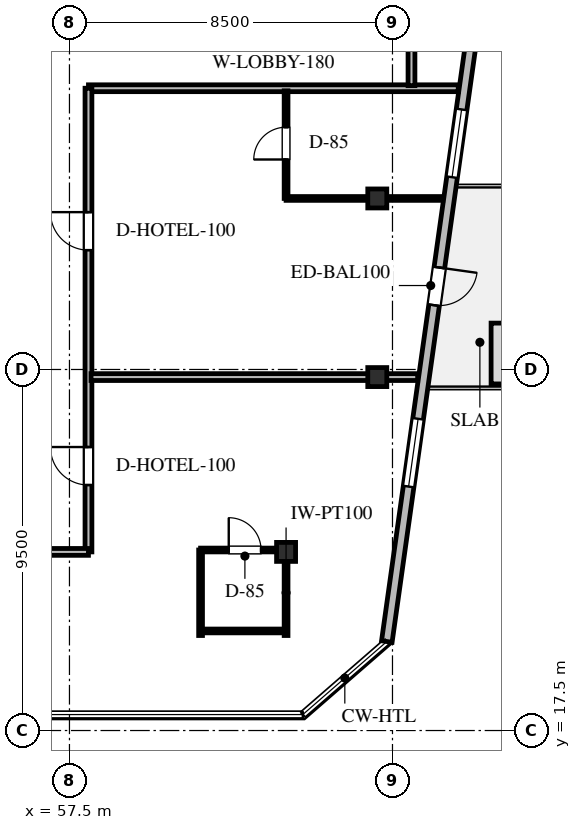
"""IFC4 building model, lengths in metres.
Left out: names, types, materials, properties, quantities, classifications, styles, units other than length and angle.
Written with IfcOpenShell. Run it as: python <this file> out.ifc"""

import sys

from ifc_helpers import new_model, si_unit, direction, frame, frame_2d, origin, origin_2d, place, context, subcontext, project, spatial, rectangle, hollow_rectangle, extrude, element, fill, save


model = new_model("IFC4")
c1 = context("Model", 3, precision=1e-05, world=origin(), true_north=direction((0.0, 1.0)))
c2 = subcontext(c1, "Body", "Model", "MODEL_VIEW")
j1 = project(units=[si_unit("LENGTHUNIT", "METRE"), si_unit("PLANEANGLEUNIT", "RADIAN")], contexts=[c1])
p1 = place(None, origin())
s1 = spatial("IfcSite", under=j1, at=p1, CompositionType="ELEMENT")
p2 = place(p1, origin())
s2 = spatial("IfcBuilding", under=s1, at=p2, CompositionType="ELEMENT")
p3 = place(p2, frame((0.0, 0.0, 256.2)))
s3 = spatial("IfcBuildingStorey", under=s2, at=p3, CompositionType="ELEMENT", Elevation=256.2)
for number, where, z_axis, x_axis in (
    (1, (65.6, 31.5, 0.0), (0.0, 0.0, 1.0), (1.0, 0.0, 0.0)),
    (2, (65.6, 26.8, 0.0), (0.0, 0.0, 1.0), (1.0, 0.0, 0.0)),
    (3, (63.2, 22.2, 0.0), (0.0, 0.0, 1.0), (1.0, 0.0, 0.0)),
):
    element("IfcColumn", number, at=place(p3, frame(where, z_axis=z_axis, x_axis=x_axis)), inside=s3, PredefinedType="COLUMN", context=c2, shape_type="SweptSolid", body=[
        extrude(hollow_rectangle(XDim=0.5, YDim=0.5, WallThickness=0.02, at=origin_2d()), origin(), (0.0, 0.0, 1.0), 3.6),
    ])
p4 = place(p3, frame((68.375, 37.8, 0.0), z_axis=(0.0, 0.0, 1.0), x_axis=(-0.13917438523, -0.990267888248, 0.0)))
e4 = element("IfcWall", 4, at=p4, inside=s3, PredefinedType="STANDARD", context=c2, shape_type="SweptSolid", body=[
    extrude(rectangle(XDim=18.135, YDim=0.28, at=frame_2d((9.067, 0.0))), origin(), (0.0, 0.0, 1.0), 3.36),
])
p5 = place(p4, frame((8.198, 0.0, 0.0)))
e5 = element("IfcOpeningElement", 5, at=p5, cuts=e4, PredefinedType="OPENING", context=c2, shape_type="SweptSolid", body=[
    extrude(rectangle(XDim=1.0, YDim=2.15, at=frame_2d((0.5, 1.075))), frame((0.0, 0.15, 0.0), z_axis=(0.0, -1.0, 0.0), x_axis=(1.0, 0.0, 0.0)), (0.0, 0.0, 1.0), 0.3),
])
p6 = place(p4, frame((3.997, 0.0, 0.65)))
e6 = element("IfcOpeningElement", 6, at=p6, cuts=e4, PredefinedType="OPENING", context=c2, shape_type="SweptSolid", body=[
    extrude(rectangle(XDim=1.8, YDim=2.1, at=frame_2d((0.9, 1.05))), frame((0.0, 0.15, 0.0), z_axis=(0.0, -1.0, 0.0), x_axis=(1.0, 0.0, 0.0)), (0.0, 0.0, 1.0), 0.3),
])
p7 = place(p4, frame((12.217, 0.0, 0.65)))
e7 = element("IfcOpeningElement", 7, at=p7, cuts=e4, PredefinedType="OPENING", context=c2, shape_type="SweptSolid", body=[
    extrude(rectangle(XDim=1.8, YDim=2.1, at=frame_2d((0.9, 1.05))), frame((0.0, 0.15, 0.0), z_axis=(0.0, -1.0, 0.0), x_axis=(1.0, 0.0, 0.0)), (0.0, 0.0, 1.0), 0.3),
])
p8 = place(p3, frame((58.0, 34.4, 0.0), z_axis=(0.0, 0.0, 1.0), x_axis=(1.0, 0.0, 0.0)))
e8 = element("IfcWall", 8, at=p8, inside=s3, PredefinedType="STANDARD", context=c2, shape_type="SweptSolid", body=[
    extrude(rectangle(XDim=9.73, YDim=0.18, at=frame_2d((4.865, 0.0))), origin(), (0.0, 0.0, 1.0), 3.36),
])
p9 = place(p3, frame((66.5, 34.468, 0.0), z_axis=(0.0, 0.0, 1.0), x_axis=(0.0, 1.0, 0.0)))
e9 = element("IfcWall", 9, at=p9, inside=s3, PredefinedType="STANDARD", context=c2, shape_type="SweptSolid", body=[
    extrude(rectangle(XDim=3.582, YDim=0.18, at=frame_2d((1.791, 0.0))), origin(), (0.0, 0.0, 1.0), 2.664),
])
p10 = place(p3, frame((58.0, 22.2, 0.0), z_axis=(0.0, 0.0, 1.0), x_axis=(0.0, 1.0, 0.0)))
e10 = element("IfcWall", 10, at=p10, inside=s3, PredefinedType="STANDARD", context=c2, shape_type="SweptSolid", body=[
    extrude(rectangle(XDim=12.2, YDim=0.18, at=frame_2d((6.1, 0.0))), origin(), (0.0, 0.0, 1.0), 2.664),
])
p11 = place(p10, frame((1.76, 0.0, 0.0)))
e11 = element("IfcOpeningElement", 11, at=p11, cuts=e10, PredefinedType="OPENING", context=c2, shape_type="SweptSolid", body=[
    extrude(rectangle(XDim=1.0, YDim=2.15, at=frame_2d((0.5, 1.075))), frame((0.0, 0.1, 0.0), z_axis=(0.0, -1.0, 0.0), x_axis=(1.0, 0.0, 0.0)), (0.0, 0.0, 1.0), 0.2),
])
p12 = place(p10, frame((7.94, 0.0, 0.0)))
e12 = element("IfcOpeningElement", 12, at=p12, cuts=e10, PredefinedType="OPENING", context=c2, shape_type="SweptSolid", body=[
    extrude(rectangle(XDim=1.0, YDim=2.15, at=frame_2d((0.5, 1.075))), frame((0.0, 0.1, 0.0), z_axis=(0.0, -1.0, 0.0), x_axis=(1.0, 0.0, 0.0)), (0.0, 0.0, 1.0), 0.2),
])
p13 = place(p3, frame((56.0, 22.2, 0.0), z_axis=(0.0, 0.0, 1.0), x_axis=(1.0, 0.0, 0.0)))
e13 = element("IfcWall", 13, at=p13, inside=s3, PredefinedType="STANDARD", context=c2, shape_type="SweptSolid", body=[
    extrude(rectangle(XDim=2.0, YDim=0.18, at=frame_2d((1.0, 0.0))), origin(), (0.0, 0.0, 1.0), 2.664),
])
p14 = place(p3, frame((58.068, 26.8, 0.0), z_axis=(0.0, 0.0, 1.0), x_axis=(1.0, 0.0, 0.0)))
e14 = element("IfcWall", 14, at=p14, inside=s3, PredefinedType="STANDARD", context=c2, shape_type="SweptSolid", body=[
    extrude(rectangle(XDim=8.594, YDim=0.18, at=frame_2d((4.297, 0.0))), origin(), (0.0, 0.0, 1.0), 2.664),
])
p15 = place(p3, frame((60.95, 22.25, 0.0), z_axis=(0.0, 0.0, 1.0), x_axis=(1.0, 0.0, 0.0)))
e15 = element("IfcWall", 15, at=p15, inside=s3, PredefinedType="PARTITIONING", context=c2, shape_type="SweptSolid", body=[
    extrude(rectangle(XDim=2.25, YDim=0.1, at=frame_2d((1.125, 0.0))), origin(), (0.0, 0.0, 1.0), 2.664),
])
p16 = place(p15, frame((0.741, 0.0, 0.0)))
e16 = element("IfcOpeningElement", 16, at=p16, cuts=e15, PredefinedType="OPENING", context=c2, shape_type="SweptSolid", body=[
    extrude(rectangle(XDim=0.85, YDim=2.1, at=frame_2d((0.425, 1.05))), frame((0.0, 0.06, 0.0), z_axis=(0.0, -1.0, 0.0), x_axis=(1.0, 0.0, 0.0)), (0.0, 0.0, 1.0), 0.12),
])
for number, where, z_axis, x_axis in (
    (17, (60.95, 20.0, 0.0), (0.0, 0.0, 1.0), (0.0, 1.0, 0.0)),
    (18, (63.2, 20.0, 0.0), (0.0, 0.0, 1.0), (0.0, 1.0, 0.0)),
):
    element("IfcWall", number, at=place(p3, frame(where, z_axis=z_axis, x_axis=x_axis)), inside=s3, PredefinedType="PARTITIONING", context=c2, shape_type="SweptSolid", body=[
        extrude(rectangle(XDim=2.25, YDim=0.1, at=frame_2d((1.125, 0.0))), origin(), (0.0, 0.0, 1.0), 2.664),
    ])
p17 = place(p3, frame((61.018, 20.12, 0.0), z_axis=(0.0, 0.0, 1.0), x_axis=(1.0, 0.0, 0.0)))
e19 = element("IfcWall", 19, at=p17, inside=s3, PredefinedType="PARTITIONING", context=c2, shape_type="SweptSolid", body=[
    extrude(rectangle(XDim=2.114, YDim=0.1, at=frame_2d((1.057, 0.0))), origin(), (0.0, 0.0, 1.0), 3.36),
])
p18 = place(p3, frame((63.2, 31.5, 0.0), z_axis=(0.0, 0.0, 1.0), x_axis=(1.0, 0.0, 0.0)))
e20 = element("IfcWall", 20, at=p18, inside=s3, PredefinedType="PARTITIONING", context=c2, shape_type="SweptSolid", body=[
    extrude(rectangle(XDim=4.123, YDim=0.1, at=frame_2d((2.062, 0.0))), origin(), (0.0, 0.0, 1.0), 2.664),
])
p19 = place(p3, frame((63.2, 31.5, 0.0), z_axis=(0.0, 0.0, 1.0), x_axis=(0.0, 1.0, 0.0)))
e21 = element("IfcWall", 21, at=p19, inside=s3, PredefinedType="PARTITIONING", context=c2, shape_type="SweptSolid", body=[
    extrude(rectangle(XDim=2.832, YDim=0.1, at=frame_2d((1.416, 0.0))), origin(), (0.0, 0.0, 1.0), 2.664),
])
p20 = place(p19, frame((1.025, 0.0, 0.0)))
e22 = element("IfcOpeningElement", 22, at=p20, cuts=e21, PredefinedType="OPENING", context=c2, shape_type="SweptSolid", body=[
    extrude(rectangle(XDim=0.85, YDim=2.1, at=frame_2d((0.425, 1.05))), frame((0.0, 0.06, 0.0), z_axis=(0.0, -1.0, 0.0), x_axis=(1.0, 0.0, 0.0)), (0.0, 0.0, 1.0), 0.12),
])
p21 = place(p5, origin())
e23 = element("IfcDoor", 23, at=p21, inside=s3, OperationType="SINGLE_SWING_LEFT", PredefinedType="DOOR", context=c2, shape_type="SweptSolid", body=[
    extrude(rectangle(XDim=1.0, YDim=2.15, at=frame_2d((0.5, 1.075))), frame((0.0, 0.025, 0.0), z_axis=(0.0, -1.0, 0.0), x_axis=(1.0, 0.0, 0.0)), (0.0, 0.0, 1.0), 0.05),
])
fill(e5, e23)
p22 = place(p6, origin())
e24 = element("IfcWindow", 24, at=p22, inside=s3, PartitioningType="SINGLE_PANEL", PredefinedType="WINDOW", context=c2, shape_type="SweptSolid", body=[
    extrude(rectangle(XDim=1.8, YDim=2.1, at=frame_2d((0.9, 1.05))), frame((0.0, 0.03, 0.0), z_axis=(0.0, -1.0, 0.0), x_axis=(1.0, 0.0, 0.0)), (0.0, 0.0, 1.0), 0.06),
])
fill(e6, e24)
p23 = place(p7, origin())
e25 = element("IfcWindow", 25, at=p23, inside=s3, PartitioningType="SINGLE_PANEL", PredefinedType="WINDOW", context=c2, shape_type="SweptSolid", body=[
    extrude(rectangle(XDim=1.8, YDim=2.1, at=frame_2d((0.9, 1.05))), frame((0.0, 0.03, 0.0), z_axis=(0.0, -1.0, 0.0), x_axis=(1.0, 0.0, 0.0)), (0.0, 0.0, 1.0), 0.06),
])
fill(e7, e25)
p24 = place(p11, origin())
e26 = element("IfcDoor", 26, at=p24, inside=s3, OperationType="SINGLE_SWING_RIGHT", PredefinedType="DOOR", context=c2, shape_type="SweptSolid", body=[
    extrude(rectangle(XDim=1.0, YDim=2.15, at=frame_2d((0.5, 1.075))), frame((0.0, 0.025, 0.0), z_axis=(0.0, -1.0, 0.0), x_axis=(1.0, 0.0, 0.0)), (0.0, 0.0, 1.0), 0.05),
])
fill(e11, e26)
p25 = place(p16, origin())
e27 = element("IfcDoor", 27, at=p25, inside=s3, OperationType="SINGLE_SWING_LEFT", PredefinedType="DOOR", context=c2, shape_type="SweptSolid", body=[
    extrude(rectangle(XDim=0.85, YDim=2.1, at=frame_2d((0.425, 1.05))), frame((0.0, 0.025, 0.0), z_axis=(0.0, -1.0, 0.0), x_axis=(1.0, 0.0, 0.0)), (0.0, 0.0, 1.0), 0.05),
])
fill(e16, e27)
p26 = place(p12, origin())
e28 = element("IfcDoor", 28, at=p26, inside=s3, OperationType="SINGLE_SWING_RIGHT", PredefinedType="DOOR", context=c2, shape_type="SweptSolid", body=[
    extrude(rectangle(XDim=1.0, YDim=2.15, at=frame_2d((0.5, 1.075))), frame((0.0, 0.025, 0.0), z_axis=(0.0, -1.0, 0.0), x_axis=(1.0, 0.0, 0.0)), (0.0, 0.0, 1.0), 0.05),
])
fill(e12, e28)
p27 = place(p20, origin())
e29 = element("IfcDoor", 29, at=p27, inside=s3, OperationType="SINGLE_SWING_LEFT", PredefinedType="DOOR", context=c2, shape_type="SweptSolid", body=[
    extrude(rectangle(XDim=0.85, YDim=2.1, at=frame_2d((0.425, 1.05))), frame((0.0, 0.025, 0.0), z_axis=(0.0, -1.0, 0.0), x_axis=(1.0, 0.0, 0.0)), (0.0, 0.0, 1.0), 0.05),
])
fill(e22, e29)
save(model, sys.argv[1])
